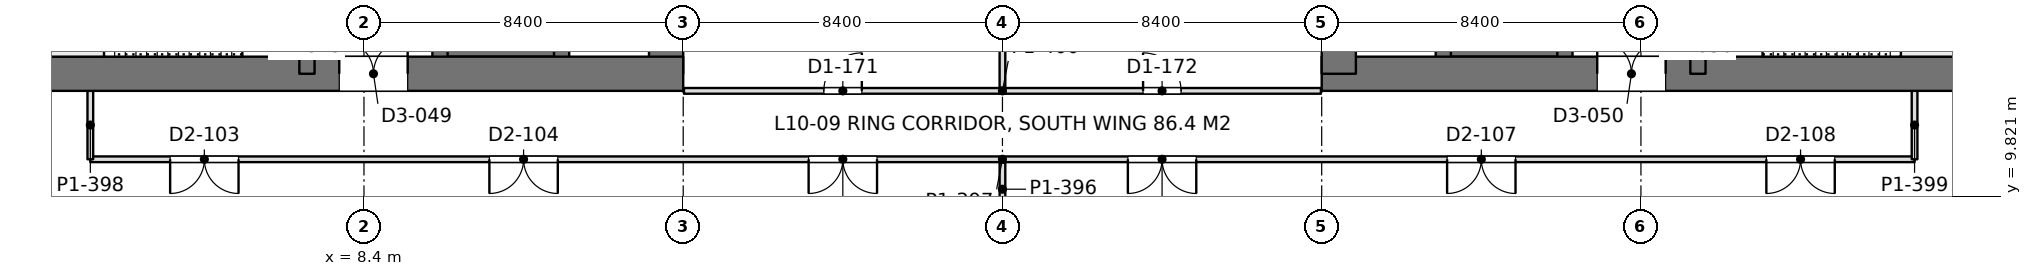
"""IFC4 building model, lengths in metres.
Left out: names, types, materials, properties, quantities, classifications, styles, units other than length and angle.
Written with IfcOpenShell. Run it as: python <this file> out.ifc"""

import sys

from ifc_helpers import new_model, si_unit, direction, frame, frame_2d, origin, place, context, subcontext, project, spatial, rectangle, extrude, element, fill, save


model = new_model("IFC4")
c1 = context("Model", 3, precision=1e-05, world=origin(), true_north=direction((0.0, 1.0)))
c2 = subcontext(c1, "Body", "Model", "MODEL_VIEW")
j1 = project(units=[si_unit("LENGTHUNIT", "METRE"), si_unit("PLANEANGLEUNIT", "RADIAN")], contexts=[c1])
p1 = place(None, origin())
s1 = spatial("IfcSite", under=j1, at=p1, CompositionType="ELEMENT")
p2 = place(p1, origin())
s2 = spatial("IfcBuilding", under=s1, at=p2, CompositionType="ELEMENT")
p3 = place(p2, frame((0.0, 0.0, 45.9)))
s3 = spatial("IfcBuildingStorey", under=s2, at=p3, CompositionType="ELEMENT", Elevation=45.9)
p4 = place(p3, frame((-1.2, 13.05, 0.0), z_axis=(0.0, 0.0, 1.0), x_axis=(1.0, 0.0, 0.0)))
e1 = element("IfcWall", 1, at=p4, inside=s3, PredefinedType="SHEAR", context=c2, shape_type="SweptSolid", body=[
    extrude(rectangle(XDim=18.0, YDim=0.9, at=frame_2d((9.0, 0.0))), origin(), (0.0, 0.0, 1.0), 4.5),
])
p5 = place(p4, frame((8.95, 0.0, 0.0)))
e2 = element("IfcOpeningElement", 2, at=p5, cuts=e1, PredefinedType="OPENING", context=c2, shape_type="SweptSolid", body=[
    extrude(rectangle(XDim=1.8, YDim=2.4, at=frame_2d((0.9, 1.2))), frame((0.0, 0.46, 0.0), z_axis=(0.0, -1.0, 0.0), x_axis=(1.0, 0.0, 0.0)), (0.0, 0.0, 1.0), 0.92),
])
p6 = place(p3, frame((16.35, 13.05, 0.0), z_axis=(0.0, 0.0, 1.0), x_axis=(0.0, 1.0, 0.0)))
e3 = element("IfcWall", 3, at=p6, inside=s3, PredefinedType="SHEAR", context=c2, shape_type="SweptSolid", body=[
    extrude(rectangle(XDim=24.3, YDim=0.9, at=frame_2d((12.15, 0.0))), origin(), (0.0, 0.0, 1.0), 4.5),
])
p7 = place(p3, frame((6.9, 13.05, 0.0), z_axis=(0.0, 0.0, 1.0), x_axis=(0.0, 1.0, 0.0)))
e4 = element("IfcWall", 4, at=p7, inside=s3, PredefinedType="SHEAR", context=c2, shape_type="SweptSolid", body=[
    extrude(rectangle(XDim=24.3, YDim=0.4, at=frame_2d((12.15, 0.0))), origin(), (0.0, 0.0, 1.0), 4.5),
])
p8 = place(p7, frame((1.3, 0.0, 0.0)))
e5 = element("IfcOpeningElement", 5, at=p8, cuts=e4, PredefinedType="OPENING", context=c2, shape_type="SweptSolid", body=[
    extrude(rectangle(XDim=1.0, YDim=2.2, at=frame_2d((0.5, 1.1))), frame((0.0, 0.21, 0.0), z_axis=(0.0, -1.0, 0.0), x_axis=(1.0, 0.0, 0.0)), (0.0, 0.0, 1.0), 0.42),
])
p9 = place(p7, frame((22.0, 0.0, 0.0)))
e6 = element("IfcOpeningElement", 6, at=p9, cuts=e4, PredefinedType="OPENING", context=c2, shape_type="SweptSolid", body=[
    extrude(rectangle(XDim=1.0, YDim=2.2, at=frame_2d((0.5, 1.1))), frame((0.0, 0.21, 0.0), z_axis=(0.0, -1.0, 0.0), x_axis=(1.0, 0.0, 0.0)), (0.0, 0.0, 1.0), 0.42),
])
p10 = place(p7, frame((5.55, 0.0, 0.0)))
e7 = element("IfcOpeningElement", 7, at=p10, cuts=e4, PredefinedType="OPENING", context=c2, shape_type="SweptSolid", body=[
    extrude(rectangle(XDim=1.0, YDim=2.2, at=frame_2d((0.5, 1.1))), frame((0.0, 0.21, 0.0), z_axis=(0.0, -1.0, 0.0), x_axis=(1.0, 0.0, 0.0)), (0.0, 0.0, 1.0), 0.42),
])
p11 = place(p7, frame((9.55, 0.0, 0.0)))
e8 = element("IfcOpeningElement", 8, at=p11, cuts=e4, PredefinedType="OPENING", context=c2, shape_type="SweptSolid", body=[
    extrude(rectangle(XDim=1.0, YDim=2.2, at=frame_2d((0.5, 1.1))), frame((0.0, 0.21, 0.0), z_axis=(0.0, -1.0, 0.0), x_axis=(1.0, 0.0, 0.0)), (0.0, 0.0, 1.0), 0.42),
])
p12 = place(p7, frame((12.8, 0.0, 0.0)))
e9 = element("IfcOpeningElement", 9, at=p12, cuts=e4, PredefinedType="OPENING", context=c2, shape_type="SweptSolid", body=[
    extrude(rectangle(XDim=1.1, YDim=2.2, at=frame_2d((0.55, 1.1))), frame((0.0, 0.21, 0.0), z_axis=(0.0, -1.0, 0.0), x_axis=(1.0, 0.0, 0.0)), (0.0, 0.0, 1.0), 0.42),
])
p13 = place(p7, frame((15.538, 0.0, 0.0)))
e10 = element("IfcOpeningElement", 10, at=p13, cuts=e4, PredefinedType="OPENING", context=c2, shape_type="SweptSolid", body=[
    extrude(rectangle(XDim=1.1, YDim=2.2, at=frame_2d((0.55, 1.1))), frame((0.0, 0.21, 0.0), z_axis=(0.0, -1.0, 0.0), x_axis=(1.0, 0.0, 0.0)), (0.0, 0.0, 1.0), 0.42),
])
p14 = place(p7, frame((18.262, 0.0, 0.0)))
e11 = element("IfcOpeningElement", 11, at=p14, cuts=e4, PredefinedType="OPENING", context=c2, shape_type="SweptSolid", body=[
    extrude(rectangle(XDim=1.1, YDim=2.2, at=frame_2d((0.55, 1.1))), frame((0.0, 0.21, 0.0), z_axis=(0.0, -1.0, 0.0), x_axis=(1.0, 0.0, 0.0)), (0.0, 0.0, 1.0), 0.42),
])
p15 = place(p3, frame((10.4, 13.05, 0.0), z_axis=(0.0, 0.0, 1.0), x_axis=(0.0, 1.0, 0.0)))
e12 = element("IfcWall", 12, at=p15, inside=s3, PredefinedType="SHEAR", context=c2, shape_type="SweptSolid", body=[
    extrude(rectangle(XDim=24.3, YDim=0.4, at=frame_2d((12.15, 0.0))), origin(), (0.0, 0.0, 1.0), 4.5),
])
p16 = place(p15, frame((1.5, 0.0, 0.0)))
e13 = element("IfcOpeningElement", 13, at=p16, cuts=e12, PredefinedType="OPENING", context=c2, shape_type="SweptSolid", body=[
    extrude(rectangle(XDim=1.1, YDim=2.2, at=frame_2d((0.55, 1.1))), frame((0.0, 0.21, 0.0), z_axis=(0.0, -1.0, 0.0), x_axis=(1.0, 0.0, 0.0)), (0.0, 0.0, 1.0), 0.42),
])
p17 = place(p15, frame((4.35, 0.0, 0.0)))
e14 = element("IfcOpeningElement", 14, at=p17, cuts=e12, PredefinedType="OPENING", context=c2, shape_type="SweptSolid", body=[
    extrude(rectangle(XDim=1.1, YDim=2.2, at=frame_2d((0.55, 1.1))), frame((0.0, 0.21, 0.0), z_axis=(0.0, -1.0, 0.0), x_axis=(1.0, 0.0, 0.0)), (0.0, 0.0, 1.0), 0.42),
])
p18 = place(p15, frame((7.2, 0.0, 0.0)))
e15 = element("IfcOpeningElement", 15, at=p18, cuts=e12, PredefinedType="OPENING", context=c2, shape_type="SweptSolid", body=[
    extrude(rectangle(XDim=1.1, YDim=2.2, at=frame_2d((0.55, 1.1))), frame((0.0, 0.21, 0.0), z_axis=(0.0, -1.0, 0.0), x_axis=(1.0, 0.0, 0.0)), (0.0, 0.0, 1.0), 0.42),
])
p19 = place(p15, frame((21.45, 0.0, 0.0)))
e16 = element("IfcOpeningElement", 16, at=p19, cuts=e12, PredefinedType="OPENING", context=c2, shape_type="SweptSolid", body=[
    extrude(rectangle(XDim=1.1, YDim=2.2, at=frame_2d((0.55, 1.1))), frame((0.0, 0.21, 0.0), z_axis=(0.0, -1.0, 0.0), x_axis=(1.0, 0.0, 0.0)), (0.0, 0.0, 1.0), 0.42),
])
p20 = place(p3, frame((13.6, 13.05, 0.0), z_axis=(0.0, 0.0, 1.0), x_axis=(0.0, 1.0, 0.0)))
e17 = element("IfcWall", 17, at=p20, inside=s3, PredefinedType="SHEAR", context=c2, shape_type="SweptSolid", body=[
    extrude(rectangle(XDim=24.3, YDim=0.4, at=frame_2d((12.15, 0.0))), origin(), (0.0, 0.0, 1.0), 4.5),
])
p21 = place(p3, frame((10.4, 13.65, 0.0), z_axis=(0.0, 0.0, 1.0), x_axis=(1.0, 0.0, 0.0)))
e18 = element("IfcWall", 18, at=p21, inside=s3, PredefinedType="SHEAR", context=c2, shape_type="SweptSolid", body=[
    extrude(rectangle(XDim=3.2, YDim=0.3, at=frame_2d((1.6, 0.0))), origin(), (0.0, 0.0, 1.0), 4.5),
])
p22 = place(p3, frame((33.6, 13.05, 0.0), z_axis=(0.0, 0.0, 1.0), x_axis=(1.0, 0.0, 0.0)))
e19 = element("IfcWall", 19, at=p22, inside=s3, PredefinedType="SHEAR", context=c2, shape_type="SweptSolid", body=[
    extrude(rectangle(XDim=18.0, YDim=0.9, at=frame_2d((9.0, 0.0))), origin(), (0.0, 0.0, 1.0), 4.5),
])
p23 = place(p22, frame((7.25, 0.0, 0.0)))
e20 = element("IfcOpeningElement", 20, at=p23, cuts=e19, PredefinedType="OPENING", context=c2, shape_type="SweptSolid", body=[
    extrude(rectangle(XDim=1.8, YDim=2.4, at=frame_2d((0.9, 1.2))), frame((0.0, 0.46, 0.0), z_axis=(0.0, -1.0, 0.0), x_axis=(1.0, 0.0, 0.0)), (0.0, 0.0, 1.0), 0.92),
])
p24 = place(p3, frame((34.05, 13.05, 0.0), z_axis=(0.0, 0.0, 1.0), x_axis=(0.0, 1.0, 0.0)))
e21 = element("IfcWall", 21, at=p24, inside=s3, PredefinedType="SHEAR", context=c2, shape_type="SweptSolid", body=[
    extrude(rectangle(XDim=24.3, YDim=0.9, at=frame_2d((12.15, 0.0))), origin(), (0.0, 0.0, 1.0), 4.5),
])
p25 = place(p3, frame((43.5, 13.05, 0.0), z_axis=(0.0, 0.0, 1.0), x_axis=(0.0, 1.0, 0.0)))
e22 = element("IfcWall", 22, at=p25, inside=s3, PredefinedType="SHEAR", context=c2, shape_type="SweptSolid", body=[
    extrude(rectangle(XDim=24.3, YDim=0.4, at=frame_2d((12.15, 0.0))), origin(), (0.0, 0.0, 1.0), 4.5),
])
p26 = place(p25, frame((1.3, 0.0, 0.0)))
e23 = element("IfcOpeningElement", 23, at=p26, cuts=e22, PredefinedType="OPENING", context=c2, shape_type="SweptSolid", body=[
    extrude(rectangle(XDim=1.0, YDim=2.2, at=frame_2d((0.5, 1.1))), frame((0.0, 0.21, 0.0), z_axis=(0.0, -1.0, 0.0), x_axis=(1.0, 0.0, 0.0)), (0.0, 0.0, 1.0), 0.42),
])
p27 = place(p25, frame((22.0, 0.0, 0.0)))
e24 = element("IfcOpeningElement", 24, at=p27, cuts=e22, PredefinedType="OPENING", context=c2, shape_type="SweptSolid", body=[
    extrude(rectangle(XDim=1.0, YDim=2.2, at=frame_2d((0.5, 1.1))), frame((0.0, 0.21, 0.0), z_axis=(0.0, -1.0, 0.0), x_axis=(1.0, 0.0, 0.0)), (0.0, 0.0, 1.0), 0.42),
])
p28 = place(p25, frame((5.55, 0.0, 0.0)))
e25 = element("IfcOpeningElement", 25, at=p28, cuts=e22, PredefinedType="OPENING", context=c2, shape_type="SweptSolid", body=[
    extrude(rectangle(XDim=1.0, YDim=2.2, at=frame_2d((0.5, 1.1))), frame((0.0, 0.21, 0.0), z_axis=(0.0, -1.0, 0.0), x_axis=(1.0, 0.0, 0.0)), (0.0, 0.0, 1.0), 0.42),
])
p29 = place(p25, frame((9.55, 0.0, 0.0)))
e26 = element("IfcOpeningElement", 26, at=p29, cuts=e22, PredefinedType="OPENING", context=c2, shape_type="SweptSolid", body=[
    extrude(rectangle(XDim=1.0, YDim=2.2, at=frame_2d((0.5, 1.1))), frame((0.0, 0.21, 0.0), z_axis=(0.0, -1.0, 0.0), x_axis=(1.0, 0.0, 0.0)), (0.0, 0.0, 1.0), 0.42),
])
p30 = place(p25, frame((12.8, 0.0, 0.0)))
e27 = element("IfcOpeningElement", 27, at=p30, cuts=e22, PredefinedType="OPENING", context=c2, shape_type="SweptSolid", body=[
    extrude(rectangle(XDim=1.1, YDim=2.2, at=frame_2d((0.55, 1.1))), frame((0.0, 0.21, 0.0), z_axis=(0.0, -1.0, 0.0), x_axis=(1.0, 0.0, 0.0)), (0.0, 0.0, 1.0), 0.42),
])
p31 = place(p25, frame((15.538, 0.0, 0.0)))
e28 = element("IfcOpeningElement", 28, at=p31, cuts=e22, PredefinedType="OPENING", context=c2, shape_type="SweptSolid", body=[
    extrude(rectangle(XDim=1.1, YDim=2.2, at=frame_2d((0.55, 1.1))), frame((0.0, 0.21, 0.0), z_axis=(0.0, -1.0, 0.0), x_axis=(1.0, 0.0, 0.0)), (0.0, 0.0, 1.0), 0.42),
])
p32 = place(p25, frame((18.262, 0.0, 0.0)))
e29 = element("IfcOpeningElement", 29, at=p32, cuts=e22, PredefinedType="OPENING", context=c2, shape_type="SweptSolid", body=[
    extrude(rectangle(XDim=1.1, YDim=2.2, at=frame_2d((0.55, 1.1))), frame((0.0, 0.21, 0.0), z_axis=(0.0, -1.0, 0.0), x_axis=(1.0, 0.0, 0.0)), (0.0, 0.0, 1.0), 0.42),
])
p33 = place(p3, frame((40.0, 13.05, 0.0), z_axis=(0.0, 0.0, 1.0), x_axis=(0.0, 1.0, 0.0)))
e30 = element("IfcWall", 30, at=p33, inside=s3, PredefinedType="SHEAR", context=c2, shape_type="SweptSolid", body=[
    extrude(rectangle(XDim=24.3, YDim=0.4, at=frame_2d((12.15, 0.0))), origin(), (0.0, 0.0, 1.0), 4.5),
])
p34 = place(p33, frame((1.5, 0.0, 0.0)))
e31 = element("IfcOpeningElement", 31, at=p34, cuts=e30, PredefinedType="OPENING", context=c2, shape_type="SweptSolid", body=[
    extrude(rectangle(XDim=1.1, YDim=2.2, at=frame_2d((0.55, 1.1))), frame((0.0, 0.21, 0.0), z_axis=(0.0, -1.0, 0.0), x_axis=(1.0, 0.0, 0.0)), (0.0, 0.0, 1.0), 0.42),
])
p35 = place(p33, frame((4.35, 0.0, 0.0)))
e32 = element("IfcOpeningElement", 32, at=p35, cuts=e30, PredefinedType="OPENING", context=c2, shape_type="SweptSolid", body=[
    extrude(rectangle(XDim=1.1, YDim=2.2, at=frame_2d((0.55, 1.1))), frame((0.0, 0.21, 0.0), z_axis=(0.0, -1.0, 0.0), x_axis=(1.0, 0.0, 0.0)), (0.0, 0.0, 1.0), 0.42),
])
p36 = place(p33, frame((7.2, 0.0, 0.0)))
e33 = element("IfcOpeningElement", 33, at=p36, cuts=e30, PredefinedType="OPENING", context=c2, shape_type="SweptSolid", body=[
    extrude(rectangle(XDim=1.1, YDim=2.2, at=frame_2d((0.55, 1.1))), frame((0.0, 0.21, 0.0), z_axis=(0.0, -1.0, 0.0), x_axis=(1.0, 0.0, 0.0)), (0.0, 0.0, 1.0), 0.42),
])
p37 = place(p33, frame((21.45, 0.0, 0.0)))
e34 = element("IfcOpeningElement", 34, at=p37, cuts=e30, PredefinedType="OPENING", context=c2, shape_type="SweptSolid", body=[
    extrude(rectangle(XDim=1.1, YDim=2.2, at=frame_2d((0.55, 1.1))), frame((0.0, 0.21, 0.0), z_axis=(0.0, -1.0, 0.0), x_axis=(1.0, 0.0, 0.0)), (0.0, 0.0, 1.0), 0.42),
])
p38 = place(p3, frame((36.8, 13.05, 0.0), z_axis=(0.0, 0.0, 1.0), x_axis=(0.0, 1.0, 0.0)))
e35 = element("IfcWall", 35, at=p38, inside=s3, PredefinedType="SHEAR", context=c2, shape_type="SweptSolid", body=[
    extrude(rectangle(XDim=24.3, YDim=0.4, at=frame_2d((12.15, 0.0))), origin(), (0.0, 0.0, 1.0), 4.5),
])
p39 = place(p3, frame((40.0, 13.65, 0.0), z_axis=(0.0, 0.0, 1.0), x_axis=(-1.0, 0.0, 0.0)))
e36 = element("IfcWall", 36, at=p39, inside=s3, PredefinedType="SHEAR", context=c2, shape_type="SweptSolid", body=[
    extrude(rectangle(XDim=3.2, YDim=0.3, at=frame_2d((1.6, 0.0))), origin(), (0.0, 0.0, 1.0), 4.5),
])
p40 = place(p3, frame((25.2, 9.299, 0.0), z_axis=(0.0, 0.0, 1.0), x_axis=(0.0, 1.0, 0.0)))
e37 = element("IfcWall", 37, at=p40, inside=s3, PredefinedType="PARTITIONING", context=c2, shape_type="SweptSolid", body=[
    extrude(rectangle(XDim=1.427, YDim=0.15, at=frame_2d((0.713, 0.0))), origin(), (0.0, 0.0, 1.0), 3.74),
])
p41 = place(p3, frame((1.2, 10.8, 0.0), z_axis=(0.0, 0.0, 1.0), x_axis=(1.0, 0.0, 0.0)))
e38 = element("IfcWall", 38, at=p41, inside=s3, PredefinedType="PARTITIONING", context=c2, shape_type="SweptSolid", body=[
    extrude(rectangle(XDim=48.0, YDim=0.15, at=frame_2d((24.0, 0.0))), origin(), (0.0, 0.0, 1.0), 3.74),
])
p42 = place(p41, frame((2.1, 0.0, 0.0)))
e39 = element("IfcOpeningElement", 39, at=p42, cuts=e38, PredefinedType="OPENING", context=c2, shape_type="SweptSolid", body=[
    extrude(rectangle(XDim=1.8, YDim=2.2, at=frame_2d((0.9, 1.1))), frame((0.0, 0.085, 0.0), z_axis=(0.0, -1.0, 0.0), x_axis=(1.0, 0.0, 0.0)), (0.0, 0.0, 1.0), 0.17),
])
p43 = place(p41, frame((10.5, 0.0, 0.0)))
e40 = element("IfcOpeningElement", 40, at=p43, cuts=e38, PredefinedType="OPENING", context=c2, shape_type="SweptSolid", body=[
    extrude(rectangle(XDim=1.8, YDim=2.2, at=frame_2d((0.9, 1.1))), frame((0.0, 0.085, 0.0), z_axis=(0.0, -1.0, 0.0), x_axis=(1.0, 0.0, 0.0)), (0.0, 0.0, 1.0), 0.17),
])
p44 = place(p41, frame((18.9, 0.0, 0.0)))
e41 = element("IfcOpeningElement", 41, at=p44, cuts=e38, PredefinedType="OPENING", context=c2, shape_type="SweptSolid", body=[
    extrude(rectangle(XDim=1.8, YDim=2.2, at=frame_2d((0.9, 1.1))), frame((0.0, 0.085, 0.0), z_axis=(0.0, -1.0, 0.0), x_axis=(1.0, 0.0, 0.0)), (0.0, 0.0, 1.0), 0.17),
])
p45 = place(p41, frame((27.3, 0.0, 0.0)))
e42 = element("IfcOpeningElement", 42, at=p45, cuts=e38, PredefinedType="OPENING", context=c2, shape_type="SweptSolid", body=[
    extrude(rectangle(XDim=1.8, YDim=2.2, at=frame_2d((0.9, 1.1))), frame((0.0, 0.085, 0.0), z_axis=(0.0, -1.0, 0.0), x_axis=(1.0, 0.0, 0.0)), (0.0, 0.0, 1.0), 0.17),
])
p46 = place(p41, frame((35.7, 0.0, 0.0)))
e43 = element("IfcOpeningElement", 43, at=p46, cuts=e38, PredefinedType="OPENING", context=c2, shape_type="SweptSolid", body=[
    extrude(rectangle(XDim=1.8, YDim=2.2, at=frame_2d((0.9, 1.1))), frame((0.0, 0.085, 0.0), z_axis=(0.0, -1.0, 0.0), x_axis=(1.0, 0.0, 0.0)), (0.0, 0.0, 1.0), 0.17),
])
p47 = place(p41, frame((44.1, 0.0, 0.0)))
e44 = element("IfcOpeningElement", 44, at=p47, cuts=e38, PredefinedType="OPENING", context=c2, shape_type="SweptSolid", body=[
    extrude(rectangle(XDim=1.8, YDim=2.2, at=frame_2d((0.9, 1.1))), frame((0.0, 0.085, 0.0), z_axis=(0.0, -1.0, 0.0), x_axis=(1.0, 0.0, 0.0)), (0.0, 0.0, 1.0), 0.17),
])
for number, where, z_axis, x_axis in (
    (45, (1.2, 10.8, 0.0), (0.0, 0.0, 1.0), (0.0, 1.0, 0.0)),
    (46, (49.2, 10.8, 0.0), (0.0, 0.0, 1.0), (0.0, 1.0, 0.0)),
):
    element("IfcWall", number, at=place(p3, frame(where, z_axis=z_axis, x_axis=x_axis)), inside=s3, PredefinedType="PARTITIONING", context=c2, shape_type="SweptSolid", body=[
        extrude(rectangle(XDim=1.802, YDim=0.15, at=frame_2d((0.901, 0.0))), origin(), (0.0, 0.0, 1.0), 4.34),
    ])
p48 = place(p3, frame((16.82, 12.6, 0.0), z_axis=(0.0, 0.0, 1.0), x_axis=(1.0, 0.0, 0.0)))
e47 = element("IfcWall", 47, at=p48, inside=s3, PredefinedType="PARTITIONING", context=c2, shape_type="SweptSolid", body=[
    extrude(rectangle(XDim=16.76, YDim=0.15, at=frame_2d((8.38, 0.0))), origin(), (0.0, 0.0, 1.0), 3.74),
])
p49 = place(p48, frame((3.68, 0.0, 0.0)))
e48 = element("IfcOpeningElement", 48, at=p49, cuts=e47, PredefinedType="OPENING", context=c2, shape_type="SweptSolid", body=[
    extrude(rectangle(XDim=1.0, YDim=2.2, at=frame_2d((0.5, 1.1))), frame((0.0, 0.085, 0.0), z_axis=(0.0, -1.0, 0.0), x_axis=(1.0, 0.0, 0.0)), (0.0, 0.0, 1.0), 0.17),
])
p50 = place(p48, frame((12.08, 0.0, 0.0)))
e49 = element("IfcOpeningElement", 49, at=p50, cuts=e47, PredefinedType="OPENING", context=c2, shape_type="SweptSolid", body=[
    extrude(rectangle(XDim=1.0, YDim=2.2, at=frame_2d((0.5, 1.1))), frame((0.0, 0.085, 0.0), z_axis=(0.0, -1.0, 0.0), x_axis=(1.0, 0.0, 0.0)), (0.0, 0.0, 1.0), 0.17),
])
p51 = place(p3, frame((25.2, 12.674, 0.0), z_axis=(0.0, 0.0, 1.0), x_axis=(0.0, 1.0, 0.0)))
e50 = element("IfcWall", 50, at=p51, inside=s3, PredefinedType="PARTITIONING", context=c2, shape_type="SweptSolid", body=[
    extrude(rectangle(XDim=3.527, YDim=0.15, at=frame_2d((1.763, 0.0))), origin(), (0.0, 0.0, 1.0), 3.74),
])
p52 = place(p5, origin())
e51 = element("IfcDoor", 51, at=p52, inside=s3, OperationType="DOUBLE_DOOR_SINGLE_SWING", PredefinedType="DOOR", context=c2, shape_type="SweptSolid", body=[
    extrude(rectangle(XDim=1.8, YDim=2.4, at=frame_2d((0.9, 1.2))), frame((0.0, 0.025, 0.0), z_axis=(0.0, -1.0, 0.0), x_axis=(1.0, 0.0, 0.0)), (0.0, 0.0, 1.0), 0.05),
])
fill(e2, e51)
p53 = place(p23, origin())
e52 = element("IfcDoor", 52, at=p53, inside=s3, OperationType="DOUBLE_DOOR_SINGLE_SWING", PredefinedType="DOOR", context=c2, shape_type="SweptSolid", body=[
    extrude(rectangle(XDim=1.8, YDim=2.4, at=frame_2d((0.9, 1.2))), frame((0.0, 0.025, 0.0), z_axis=(0.0, -1.0, 0.0), x_axis=(1.0, 0.0, 0.0)), (0.0, 0.0, 1.0), 0.05),
])
fill(e20, e52)
p54 = place(p42, frame((1.8, 0.0, 0.0), z_axis=(0.0, 0.0, 1.0), x_axis=(-1.0, 0.0, 0.0)))
e53 = element("IfcDoor", 53, at=p54, inside=s3, OperationType="DOUBLE_DOOR_SINGLE_SWING", PredefinedType="DOOR", context=c2, shape_type="SweptSolid", body=[
    extrude(rectangle(XDim=1.8, YDim=2.2, at=frame_2d((0.9, 1.1))), frame((0.0, 0.025, 0.0), z_axis=(0.0, -1.0, 0.0), x_axis=(1.0, 0.0, 0.0)), (0.0, 0.0, 1.0), 0.05),
])
fill(e39, e53)
p55 = place(p43, frame((1.8, 0.0, 0.0), z_axis=(0.0, 0.0, 1.0), x_axis=(-1.0, 0.0, 0.0)))
e54 = element("IfcDoor", 54, at=p55, inside=s3, OperationType="DOUBLE_DOOR_SINGLE_SWING", PredefinedType="DOOR", context=c2, shape_type="SweptSolid", body=[
    extrude(rectangle(XDim=1.8, YDim=2.2, at=frame_2d((0.9, 1.1))), frame((0.0, 0.025, 0.0), z_axis=(0.0, -1.0, 0.0), x_axis=(1.0, 0.0, 0.0)), (0.0, 0.0, 1.0), 0.05),
])
fill(e40, e54)
p56 = place(p44, frame((1.8, 0.0, 0.0), z_axis=(0.0, 0.0, 1.0), x_axis=(-1.0, 0.0, 0.0)))
e55 = element("IfcDoor", 55, at=p56, inside=s3, OperationType="DOUBLE_DOOR_SINGLE_SWING", PredefinedType="DOOR", context=c2, shape_type="SweptSolid", body=[
    extrude(rectangle(XDim=1.8, YDim=2.2, at=frame_2d((0.9, 1.1))), frame((0.0, 0.025, 0.0), z_axis=(0.0, -1.0, 0.0), x_axis=(1.0, 0.0, 0.0)), (0.0, 0.0, 1.0), 0.05),
])
fill(e41, e55)
p57 = place(p45, frame((1.8, 0.0, 0.0), z_axis=(0.0, 0.0, 1.0), x_axis=(-1.0, 0.0, 0.0)))
e56 = element("IfcDoor", 56, at=p57, inside=s3, OperationType="DOUBLE_DOOR_SINGLE_SWING", PredefinedType="DOOR", context=c2, shape_type="SweptSolid", body=[
    extrude(rectangle(XDim=1.8, YDim=2.2, at=frame_2d((0.9, 1.1))), frame((0.0, 0.025, 0.0), z_axis=(0.0, -1.0, 0.0), x_axis=(1.0, 0.0, 0.0)), (0.0, 0.0, 1.0), 0.05),
])
fill(e42, e56)
p58 = place(p46, frame((1.8, 0.0, 0.0), z_axis=(0.0, 0.0, 1.0), x_axis=(-1.0, 0.0, 0.0)))
e57 = element("IfcDoor", 57, at=p58, inside=s3, OperationType="DOUBLE_DOOR_SINGLE_SWING", PredefinedType="DOOR", context=c2, shape_type="SweptSolid", body=[
    extrude(rectangle(XDim=1.8, YDim=2.2, at=frame_2d((0.9, 1.1))), frame((0.0, 0.025, 0.0), z_axis=(0.0, -1.0, 0.0), x_axis=(1.0, 0.0, 0.0)), (0.0, 0.0, 1.0), 0.05),
])
fill(e43, e57)
p59 = place(p47, frame((1.8, 0.0, 0.0), z_axis=(0.0, 0.0, 1.0), x_axis=(-1.0, 0.0, 0.0)))
e58 = element("IfcDoor", 58, at=p59, inside=s3, OperationType="DOUBLE_DOOR_SINGLE_SWING", PredefinedType="DOOR", context=c2, shape_type="SweptSolid", body=[
    extrude(rectangle(XDim=1.8, YDim=2.2, at=frame_2d((0.9, 1.1))), frame((0.0, 0.025, 0.0), z_axis=(0.0, -1.0, 0.0), x_axis=(1.0, 0.0, 0.0)), (0.0, 0.0, 1.0), 0.05),
])
fill(e44, e58)
p60 = place(p49, origin())
e59 = element("IfcDoor", 59, at=p60, inside=s3, OperationType="SINGLE_SWING_RIGHT", PredefinedType="DOOR", context=c2, shape_type="SweptSolid", body=[
    extrude(rectangle(XDim=1.0, YDim=2.2, at=frame_2d((0.5, 1.1))), frame((0.0, 0.025, 0.0), z_axis=(0.0, -1.0, 0.0), x_axis=(1.0, 0.0, 0.0)), (0.0, 0.0, 1.0), 0.05),
])
fill(e48, e59)
p61 = place(p50, origin())
e60 = element("IfcDoor", 60, at=p61, inside=s3, OperationType="SINGLE_SWING_LEFT", PredefinedType="DOOR", context=c2, shape_type="SweptSolid", body=[
    extrude(rectangle(XDim=1.0, YDim=2.2, at=frame_2d((0.5, 1.1))), frame((0.0, 0.025, 0.0), z_axis=(0.0, -1.0, 0.0), x_axis=(1.0, 0.0, 0.0)), (0.0, 0.0, 1.0), 0.05),
])
fill(e49, e60)
save(model, sys.argv[1])
